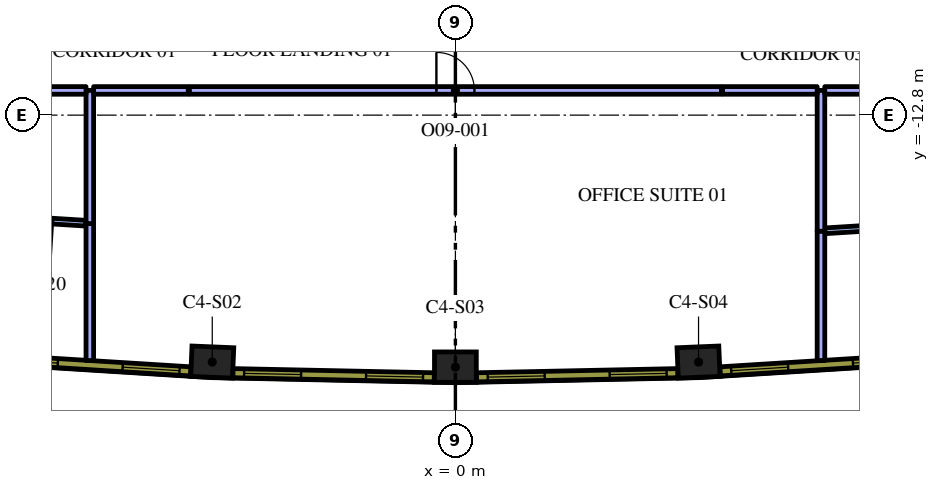
"""IFC4 building model, lengths in metres.
Left out: names, types, materials, properties, quantities, classifications, styles, units other than length and angle.
Written with IfcOpenShell. Run it as: python <this file> out.ifc"""

import sys

from ifc_helpers import new_model, si_unit, direction, frame, frame_2d, origin, origin_2d, place, context, subcontext, project, spatial, rectangle, extrude, element, fill, save


model = new_model("IFC4")
c1 = context("Model", 3, precision=1e-05, world=origin(), true_north=direction((0.0, 1.0)))
c2 = subcontext(c1, "Body", "Model", "MODEL_VIEW")
j1 = project(units=[si_unit("LENGTHUNIT", "METRE"), si_unit("PLANEANGLEUNIT", "RADIAN")], contexts=[c1])
p1 = place(None, origin())
s1 = spatial("IfcSite", under=j1, at=p1, CompositionType="ELEMENT")
p2 = place(p1, origin())
s2 = spatial("IfcBuilding", under=s1, at=p2, CompositionType="ELEMENT")
p3 = place(p2, frame((0.0, 0.0, 239.4)))
s3 = spatial("IfcBuildingStorey", under=s2, at=p3, CompositionType="ELEMENT", Elevation=239.4)
for number, where, z_axis, x_axis in (
    (1, (-6.398, -19.298, 0.0), (0.0, 0.0, 1.0), (0.999, -0.041, 0.0)),
    (2, (0.0, -19.431, 0.0), (0.0, 0.0, 1.0), (1.0, 0.0, 0.0)),
    (3, (6.398, -19.298, 0.0), (0.0, 0.0, 1.0), (0.999, 0.041, 0.0)),
):
    element("IfcColumn", number, at=place(p3, frame(where, z_axis=z_axis, x_axis=x_axis)), inside=s3, PredefinedType="COLUMN", context=c2, shape_type="SweptSolid", body=[
        extrude(rectangle(XDim=1.1, YDim=0.8, at=origin_2d()), origin(), (0.0, 0.0, 1.0), 4.2),
    ])
p4 = place(p3, frame((9.62, -15.847, 0.0), z_axis=(0.0, 0.0, 1.0), x_axis=(0.0, -1.0, 0.0)))
e4 = element("IfcWall", 4, at=p4, inside=s3, PredefinedType="PARTITIONING", context=c2, shape_type="SweptSolid", body=[
    extrude(rectangle(XDim=3.411, YDim=0.2, at=frame_2d((1.705, 0.0))), origin(), (0.0, 0.0, 1.0), 3.45),
])
p5 = place(p3, frame((9.62, -12.15, 0.0), z_axis=(0.0, 0.0, 1.0), x_axis=(0.0, -1.0, 0.0)))
e5 = element("IfcWall", 5, at=p5, inside=s3, PredefinedType="PARTITIONING", context=c2, shape_type="SweptSolid", body=[
    extrude(rectangle(XDim=3.705, YDim=0.2, at=frame_2d((1.853, 0.0))), origin(), (0.0, 0.0, 1.0), 3.45),
])
p6 = place(p3, frame((-9.62, -19.257, 0.0), z_axis=(0.0, 0.0, 1.0), x_axis=(0.0, 1.0, 0.0)))
e6 = element("IfcWall", 6, at=p6, inside=s3, PredefinedType="PARTITIONING", context=c2, shape_type="SweptSolid", body=[
    extrude(rectangle(XDim=3.611, YDim=0.2, at=frame_2d((1.806, 0.0))), origin(), (0.0, 0.0, 1.0), 3.45),
])
p7 = place(p3, frame((-9.62, -15.654, 0.0), z_axis=(0.0, 0.0, 1.0), x_axis=(0.0, 1.0, 0.0)))
e7 = element("IfcWall", 7, at=p7, inside=s3, PredefinedType="PARTITIONING", context=c2, shape_type="SweptSolid", body=[
    extrude(rectangle(XDim=3.504, YDim=0.2, at=frame_2d((1.752, 0.0))), origin(), (0.0, 0.0, 1.0), 3.45),
])
p8 = place(p3, frame((-7.0, -12.15, 0.0), z_axis=(0.0, 0.0, 1.0), x_axis=(1.0, 0.0, 0.0)))
e8 = element("IfcWall", 8, at=p8, inside=s3, PredefinedType="PARTITIONING", context=c2, shape_type="SweptSolid", body=[
    extrude(rectangle(XDim=14.0, YDim=0.2, at=frame_2d((7.0, 0.0))), origin(), (0.0, 0.0, 1.0), 3.45),
])
p9 = place(p8, frame((6.5, 0.0, 0.0)))
e9 = element("IfcOpeningElement", 9, at=p9, cuts=e8, PredefinedType="OPENING", context=c2, shape_type="SweptSolid", body=[
    extrude(rectangle(XDim=1.0, YDim=2.1, at=frame_2d((0.5, 1.05))), frame((0.0, 0.11, 0.0), z_axis=(0.0, -1.0, 0.0), x_axis=(1.0, 0.0, 0.0)), (0.0, 0.0, 1.0), 0.22),
])
for number, where, z_axis, x_axis in (
    (10, (-9.52, -12.15, 0.0), (0.0, 0.0, 1.0), (1.0, 0.0, 0.0)),
    (11, (7.03, -12.15, 0.0), (0.0, 0.0, 1.0), (1.0, 0.0, 0.0)),
):
    element("IfcWall", number, at=place(p3, frame(where, z_axis=z_axis, x_axis=x_axis)), inside=s3, PredefinedType="PARTITIONING", context=c2, shape_type="SweptSolid", body=[
        extrude(rectangle(XDim=2.49, YDim=0.2, at=frame_2d((1.245, 0.0))), origin(), (0.0, 0.0, 1.0), 3.45),
    ])
p10 = place(p3, frame((9.72, -15.844, 0.0), z_axis=(0.0, 0.0, 1.0), x_axis=(0.998063411199, 0.062204720286, 0.0)))
e12 = element("IfcWall", 12, at=p10, inside=s3, PredefinedType="PARTITIONING", context=c2, shape_type="SweptSolid", body=[
    extrude(rectangle(XDim=2.802, YDim=0.15, at=frame_2d((1.401, 0.0))), origin(), (0.0, 0.0, 1.0), 3.45),
])
p11 = place(p3, frame((9.72, -12.15, 0.0), z_axis=(0.0, 0.0, 1.0), x_axis=(1.0, 0.0, 0.0)))
e13 = element("IfcWall", 13, at=p11, inside=s3, PredefinedType="PARTITIONING", context=c2, shape_type="SweptSolid", body=[
    extrude(rectangle(XDim=4.627, YDim=0.2, at=frame_2d((2.314, 0.0))), origin(), (0.0, 0.0, 1.0), 3.45),
])
p12 = place(p11, frame((1.8, 0.0, 0.0)))
e14 = element("IfcOpeningElement", 14, at=p12, cuts=e13, PredefinedType="OPENING", context=c2, shape_type="SweptSolid", body=[
    extrude(rectangle(XDim=1.0, YDim=2.1, at=frame_2d((0.5, 1.05))), frame((0.0, 0.11, 0.0), z_axis=(0.0, -1.0, 0.0), x_axis=(1.0, 0.0, 0.0)), (0.0, 0.0, 1.0), 0.22),
])
p13 = place(p3, frame((-9.72, -15.644, 0.0), z_axis=(0.0, 0.0, 1.0), x_axis=(-0.998064382534, 0.062189133425, 0.0)))
e15 = element("IfcWall", 15, at=p13, inside=s3, PredefinedType="PARTITIONING", context=c2, shape_type="SweptSolid", body=[
    extrude(rectangle(XDim=2.571, YDim=0.15, at=frame_2d((1.286, 0.0))), origin(), (0.0, 0.0, 1.0), 3.45),
])
p14 = place(p13, frame((0.871, 0.0, 0.0)))
e16 = element("IfcOpeningElement", 16, at=p14, cuts=e15, PredefinedType="OPENING", context=c2, shape_type="SweptSolid", body=[
    extrude(rectangle(XDim=0.9, YDim=2.1, at=frame_2d((0.45, 1.05))), frame((0.0, 0.085, 0.0), z_axis=(0.0, -1.0, 0.0), x_axis=(1.0, 0.0, 0.0)), (0.0, 0.0, 1.0), 0.17),
])
p15 = place(p3, frame((-14.317, -12.15, 0.0), z_axis=(0.0, 0.0, 1.0), x_axis=(1.0, 0.0, 0.0)))
e17 = element("IfcWall", 17, at=p15, inside=s3, PredefinedType="PARTITIONING", context=c2, shape_type="SweptSolid", body=[
    extrude(rectangle(XDim=4.597, YDim=0.2, at=frame_2d((2.299, 0.0))), origin(), (0.0, 0.0, 1.0), 3.45),
])
p16 = place(p15, frame((1.8, 0.0, 0.0)))
e18 = element("IfcOpeningElement", 18, at=p16, cuts=e17, PredefinedType="OPENING", context=c2, shape_type="SweptSolid", body=[
    extrude(rectangle(XDim=1.0, YDim=2.1, at=frame_2d((0.5, 1.05))), frame((0.0, 0.11, 0.0), z_axis=(0.0, -1.0, 0.0), x_axis=(1.0, 0.0, 0.0)), (0.0, 0.0, 1.0), 0.22),
])
p17 = place(p3, frame((-12.253, -19.213, 0.0), z_axis=(0.0, 0.0, 1.0), x_axis=(0.9980633213, -0.062206162685, 0.0)))
e19 = element("IfcWall", 19, at=p17, inside=s3, PredefinedType="SOLIDWALL", context=c2, shape_type="SweptSolid", body=[
    extrude(rectangle(XDim=5.298, YDim=0.24, at=frame_2d((2.649, 0.0))), origin(), (0.0, 0.0, 1.0), 3.95),
])
p18 = place(p17, frame((0.294, 0.0, 0.9)))
e20 = element("IfcOpeningElement", 20, at=p18, cuts=e19, PredefinedType="OPENING", context=c2, shape_type="SweptSolid", body=[
    extrude(rectangle(XDim=1.5, YDim=2.55, at=frame_2d((0.75, 1.275))), frame((0.0, 0.13, 0.0), z_axis=(0.0, -1.0, 0.0), x_axis=(1.0, 0.0, 0.0)), (0.0, 0.0, 1.0), 0.26),
])
p19 = place(p17, frame((3.504, 0.0, 0.9)))
e21 = element("IfcOpeningElement", 21, at=p19, cuts=e19, PredefinedType="OPENING", context=c2, shape_type="SweptSolid", body=[
    extrude(rectangle(XDim=1.5, YDim=2.55, at=frame_2d((0.75, 1.275))), frame((0.0, 0.13, 0.0), z_axis=(0.0, -1.0, 0.0), x_axis=(1.0, 0.0, 0.0)), (0.0, 0.0, 1.0), 0.26),
])
p20 = place(p3, frame((-5.854, -19.589, 0.0), z_axis=(0.0, 0.0, 1.0), x_axis=(0.999784035184, -0.020781794712, 0.0)))
e22 = element("IfcWall", 22, at=p20, inside=s3, PredefinedType="SOLIDWALL", context=c2, shape_type="SweptSolid", body=[
    extrude(rectangle(XDim=5.298, YDim=0.24, at=frame_2d((2.649, 0.0))), origin(), (0.0, 0.0, 1.0), 3.95),
])
p21 = place(p20, frame((0.294, 0.0, 0.9)))
e23 = element("IfcOpeningElement", 23, at=p21, cuts=e22, PredefinedType="OPENING", context=c2, shape_type="SweptSolid", body=[
    extrude(rectangle(XDim=1.5, YDim=2.55, at=frame_2d((0.75, 1.275))), frame((0.0, 0.13, 0.0), z_axis=(0.0, -1.0, 0.0), x_axis=(1.0, 0.0, 0.0)), (0.0, 0.0, 1.0), 0.26),
])
p22 = place(p20, frame((3.504, 0.0, 0.9)))
e24 = element("IfcOpeningElement", 24, at=p22, cuts=e22, PredefinedType="OPENING", context=c2, shape_type="SweptSolid", body=[
    extrude(rectangle(XDim=1.5, YDim=2.55, at=frame_2d((0.75, 1.275))), frame((0.0, 0.13, 0.0), z_axis=(0.0, -1.0, 0.0), x_axis=(1.0, 0.0, 0.0)), (0.0, 0.0, 1.0), 0.26),
])
p23 = place(p3, frame((0.556, -19.699, 0.0), z_axis=(0.0, 0.0, 1.0), x_axis=(0.999784035184, 0.020781794712, 0.0)))
e25 = element("IfcWall", 25, at=p23, inside=s3, PredefinedType="SOLIDWALL", context=c2, shape_type="SweptSolid", body=[
    extrude(rectangle(XDim=5.298, YDim=0.24, at=frame_2d((2.649, 0.0))), origin(), (0.0, 0.0, 1.0), 3.95),
])
p24 = place(p23, frame((0.294, 0.0, 0.9)))
e26 = element("IfcOpeningElement", 26, at=p24, cuts=e25, PredefinedType="OPENING", context=c2, shape_type="SweptSolid", body=[
    extrude(rectangle(XDim=1.5, YDim=2.55, at=frame_2d((0.75, 1.275))), frame((0.0, 0.13, 0.0), z_axis=(0.0, -1.0, 0.0), x_axis=(1.0, 0.0, 0.0)), (0.0, 0.0, 1.0), 0.26),
])
p25 = place(p23, frame((3.504, 0.0, 0.9)))
e27 = element("IfcOpeningElement", 27, at=p25, cuts=e25, PredefinedType="OPENING", context=c2, shape_type="SweptSolid", body=[
    extrude(rectangle(XDim=1.5, YDim=2.55, at=frame_2d((0.75, 1.275))), frame((0.0, 0.13, 0.0), z_axis=(0.0, -1.0, 0.0), x_axis=(1.0, 0.0, 0.0)), (0.0, 0.0, 1.0), 0.26),
])
p26 = place(p3, frame((6.965, -19.543, 0.0), z_axis=(0.0, 0.0, 1.0), x_axis=(0.9980633213, 0.062206162685, 0.0)))
e28 = element("IfcWall", 28, at=p26, inside=s3, PredefinedType="SOLIDWALL", context=c2, shape_type="SweptSolid", body=[
    extrude(rectangle(XDim=5.298, YDim=0.24, at=frame_2d((2.649, 0.0))), origin(), (0.0, 0.0, 1.0), 3.95),
])
p27 = place(p26, frame((0.295, 0.0, 0.9)))
e29 = element("IfcOpeningElement", 29, at=p27, cuts=e28, PredefinedType="OPENING", context=c2, shape_type="SweptSolid", body=[
    extrude(rectangle(XDim=1.5, YDim=2.55, at=frame_2d((0.75, 1.275))), frame((0.0, 0.13, 0.0), z_axis=(0.0, -1.0, 0.0), x_axis=(1.0, 0.0, 0.0)), (0.0, 0.0, 1.0), 0.26),
])
p28 = place(p26, frame((3.504, 0.0, 0.9)))
e30 = element("IfcOpeningElement", 30, at=p28, cuts=e28, PredefinedType="OPENING", context=c2, shape_type="SweptSolid", body=[
    extrude(rectangle(XDim=1.5, YDim=2.55, at=frame_2d((0.75, 1.275))), frame((0.0, 0.13, 0.0), z_axis=(0.0, -1.0, 0.0), x_axis=(1.0, 0.0, 0.0)), (0.0, 0.0, 1.0), 0.26),
])
p29 = place(p9, origin())
e31 = element("IfcDoor", 31, at=p29, inside=s3, OperationType="SINGLE_SWING_RIGHT", PredefinedType="DOOR", context=c2, shape_type="SweptSolid", body=[
    extrude(rectangle(XDim=1.0, YDim=2.1, at=frame_2d((0.5, 1.05))), frame((0.0, 0.025, 0.0), z_axis=(0.0, -1.0, 0.0), x_axis=(1.0, 0.0, 0.0)), (0.0, 0.0, 1.0), 0.05),
])
fill(e9, e31)
p30 = place(p14, origin())
e32 = element("IfcDoor", 32, at=p30, inside=s3, OperationType="SINGLE_SWING_RIGHT", PredefinedType="DOOR", context=c2, shape_type="SweptSolid", body=[
    extrude(rectangle(XDim=0.9, YDim=2.1, at=frame_2d((0.45, 1.05))), frame((0.0, 0.025, 0.0), z_axis=(0.0, -1.0, 0.0), x_axis=(1.0, 0.0, 0.0)), (0.0, 0.0, 1.0), 0.05),
])
fill(e16, e32)
p31 = place(p18, origin())
e33 = element("IfcWindow", 33, at=p31, inside=s3, PartitioningType="SINGLE_PANEL", PredefinedType="WINDOW", context=c2, shape_type="SweptSolid", body=[
    extrude(rectangle(XDim=1.5, YDim=2.55, at=frame_2d((0.75, 1.275))), frame((0.0, 0.04, 0.0), z_axis=(0.0, -1.0, 0.0), x_axis=(1.0, 0.0, 0.0)), (0.0, 0.0, 1.0), 0.06),
])
fill(e20, e33)
p32 = place(p19, origin())
e34 = element("IfcWindow", 34, at=p32, inside=s3, PartitioningType="SINGLE_PANEL", PredefinedType="WINDOW", context=c2, shape_type="SweptSolid", body=[
    extrude(rectangle(XDim=1.5, YDim=2.55, at=frame_2d((0.75, 1.275))), frame((0.0, 0.04, 0.0), z_axis=(0.0, -1.0, 0.0), x_axis=(1.0, 0.0, 0.0)), (0.0, 0.0, 1.0), 0.06),
])
fill(e21, e34)
p33 = place(p21, origin())
e35 = element("IfcWindow", 35, at=p33, inside=s3, PartitioningType="SINGLE_PANEL", PredefinedType="WINDOW", context=c2, shape_type="SweptSolid", body=[
    extrude(rectangle(XDim=1.5, YDim=2.55, at=frame_2d((0.75, 1.275))), frame((0.0, 0.04, 0.0), z_axis=(0.0, -1.0, 0.0), x_axis=(1.0, 0.0, 0.0)), (0.0, 0.0, 1.0), 0.06),
])
fill(e23, e35)
p34 = place(p22, origin())
e36 = element("IfcWindow", 36, at=p34, inside=s3, PartitioningType="SINGLE_PANEL", PredefinedType="WINDOW", context=c2, shape_type="SweptSolid", body=[
    extrude(rectangle(XDim=1.5, YDim=2.55, at=frame_2d((0.75, 1.275))), frame((0.0, 0.04, 0.0), z_axis=(0.0, -1.0, 0.0), x_axis=(1.0, 0.0, 0.0)), (0.0, 0.0, 1.0), 0.06),
])
fill(e24, e36)
p35 = place(p24, origin())
e37 = element("IfcWindow", 37, at=p35, inside=s3, PartitioningType="SINGLE_PANEL", PredefinedType="WINDOW", context=c2, shape_type="SweptSolid", body=[
    extrude(rectangle(XDim=1.5, YDim=2.55, at=frame_2d((0.75, 1.275))), frame((0.0, 0.04, 0.0), z_axis=(0.0, -1.0, 0.0), x_axis=(1.0, 0.0, 0.0)), (0.0, 0.0, 1.0), 0.06),
])
fill(e26, e37)
p36 = place(p25, origin())
e38 = element("IfcWindow", 38, at=p36, inside=s3, PartitioningType="SINGLE_PANEL", PredefinedType="WINDOW", context=c2, shape_type="SweptSolid", body=[
    extrude(rectangle(XDim=1.5, YDim=2.55, at=frame_2d((0.75, 1.275))), frame((0.0, 0.04, 0.0), z_axis=(0.0, -1.0, 0.0), x_axis=(1.0, 0.0, 0.0)), (0.0, 0.0, 1.0), 0.06),
])
fill(e27, e38)
p37 = place(p27, origin())
e39 = element("IfcWindow", 39, at=p37, inside=s3, PartitioningType="SINGLE_PANEL", PredefinedType="WINDOW", context=c2, shape_type="SweptSolid", body=[
    extrude(rectangle(XDim=1.5, YDim=2.55, at=frame_2d((0.75, 1.275))), frame((0.0, 0.04, 0.0), z_axis=(0.0, -1.0, 0.0), x_axis=(1.0, 0.0, 0.0)), (0.0, 0.0, 1.0), 0.06),
])
fill(e29, e39)
p38 = place(p28, origin())
e40 = element("IfcWindow", 40, at=p38, inside=s3, PartitioningType="SINGLE_PANEL", PredefinedType="WINDOW", context=c2, shape_type="SweptSolid", body=[
    extrude(rectangle(XDim=1.5, YDim=2.55, at=frame_2d((0.75, 1.275))), frame((0.0, 0.04, 0.0), z_axis=(0.0, -1.0, 0.0), x_axis=(1.0, 0.0, 0.0)), (0.0, 0.0, 1.0), 0.06),
])
fill(e30, e40)
save(model, sys.argv[1])
